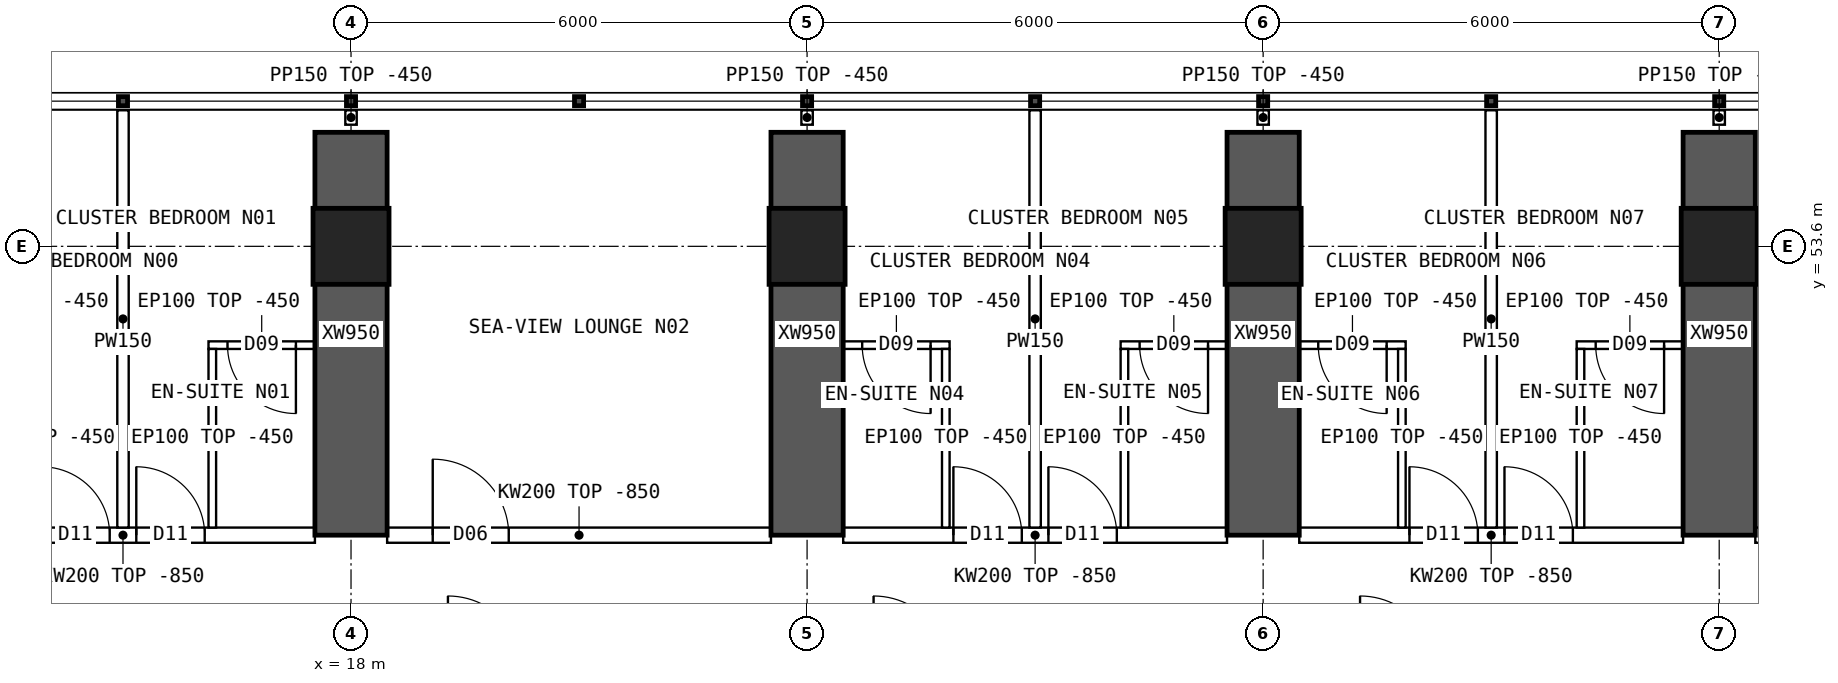
"""IFC4 building model, lengths in metres.
Left out: names, types, materials, properties, quantities, classifications, styles, units other than length and angle.
Written with IfcOpenShell. Run it as: python <this file> out.ifc"""

import sys

from ifc_helpers import new_model, si_unit, direction, frame, frame_2d, origin, origin_2d, place, context, subcontext, project, spatial, polyline, rectangle, hollow_rectangle, outline, extrude, element, fill, save


model = new_model("IFC4")
c1 = context("Model", 3, precision=1e-05, world=origin(), true_north=direction((0.0, 1.0)))
c2 = subcontext(c1, "Body", "Model", "MODEL_VIEW")
j1 = project(units=[si_unit("LENGTHUNIT", "METRE"), si_unit("PLANEANGLEUNIT", "RADIAN")], contexts=[c1])
p1 = place(None, origin())
s1 = spatial("IfcSite", under=j1, at=p1, CompositionType="ELEMENT")
p2 = place(p1, origin())
s2 = spatial("IfcBuilding", under=s1, at=p2, CompositionType="ELEMENT")
p3 = place(p2, frame((0.0, 0.0, 80.65)))
s3 = spatial("IfcBuildingStorey", under=s2, at=p3, CompositionType="ELEMENT", Elevation=80.65)
for number, where, z_axis, x_axis in (
    (1, (18.0, 53.6, 0.0), (0.0, 0.0, 1.0), (1.0, 0.0, 0.0)),
    (2, (24.0, 53.6, 0.0), (0.0, 0.0, 1.0), (1.0, 0.0, 0.0)),
    (3, (30.0, 53.6, 0.0), (0.0, 0.0, 1.0), (1.0, 0.0, 0.0)),
    (4, (36.0, 53.6, 0.0), (0.0, 0.0, 1.0), (1.0, 0.0, 0.0)),
):
    element("IfcColumn", number, at=place(p3, frame(where, z_axis=z_axis, x_axis=x_axis)), inside=s3, PredefinedType="COLUMN", context=c2, shape_type="SweptSolid", body=[
        extrude(hollow_rectangle(XDim=1.0, YDim=1.0, WallThickness=0.1, at=origin_2d()), origin(), (0.0, 0.0, 1.0), 3.75),
    ])
for number, where, z_axis, x_axis in (
    (5, (18.0, 49.8, 0.0), (0.0, 0.0, 1.0), (0.0, 1.0, 0.0)),
    (6, (24.0, 49.8, 0.0), (0.0, 0.0, 1.0), (0.0, 1.0, 0.0)),
    (7, (30.0, 49.8, 0.0), (0.0, 0.0, 1.0), (0.0, 1.0, 0.0)),
    (8, (36.0, 49.8, 0.0), (0.0, 0.0, 1.0), (0.0, 1.0, 0.0)),
):
    element("IfcWall", number, at=place(p3, frame(where, z_axis=z_axis, x_axis=x_axis)), inside=s3, PredefinedType="SHEAR", context=c2, shape_type="SweptSolid", body=[
        extrude(rectangle(XDim=5.3, YDim=0.95, at=frame_2d((2.65, 0.0))), origin(), (0.0, 0.0, 1.0), 3.75),
    ])
p4 = place(p3, frame((12.475, 49.8, 0.0), z_axis=(0.0, 0.0, 1.0), x_axis=(1.0, 0.0, 0.0)))
e9 = element("IfcWall", 9, at=p4, inside=s3, PredefinedType="SOLIDWALL", context=c2, shape_type="SweptSolid", body=[
    extrude(outline(polyline([(0.0, 0.0), (5.05, 0.0), (5.05, 2.9), (0.0, 2.9), (0.0, 0.0)])), frame((0.0, 0.1, 0.0), z_axis=(0.0, -1.0, 0.0), x_axis=(1.0, 0.0, 0.0)), (0.0, 0.0, 1.0), 0.2),
])
p5 = place(p4, frame((1.45, 0.0, 0.0)))
e10 = element("IfcOpeningElement", 10, at=p5, cuts=e9, PredefinedType="OPENING", context=c2, shape_type="SweptSolid", body=[
    extrude(rectangle(XDim=0.9, YDim=2.1, at=frame_2d((0.45, 1.05))), frame((0.0, 0.11, 0.0), z_axis=(0.0, -1.0, 0.0), x_axis=(1.0, 0.0, 0.0)), (0.0, 0.0, 1.0), 0.22),
])
p6 = place(p4, frame((2.7, 0.0, 0.0)))
e11 = element("IfcOpeningElement", 11, at=p6, cuts=e9, PredefinedType="OPENING", context=c2, shape_type="SweptSolid", body=[
    extrude(rectangle(XDim=0.9, YDim=2.1, at=frame_2d((0.45, 1.05))), frame((0.0, 0.11, 0.0), z_axis=(0.0, -1.0, 0.0), x_axis=(1.0, 0.0, 0.0)), (0.0, 0.0, 1.0), 0.22),
])
p7 = place(p3, frame((18.475, 49.8, 0.0), z_axis=(0.0, 0.0, 1.0), x_axis=(1.0, 0.0, 0.0)))
e12 = element("IfcWall", 12, at=p7, inside=s3, PredefinedType="SOLIDWALL", context=c2, shape_type="SweptSolid", body=[
    extrude(outline(polyline([(0.0, 0.0), (5.05, 0.0), (5.05, 2.9), (0.0, 2.9), (0.0, 0.0)])), frame((0.0, 0.1, 0.0), z_axis=(0.0, -1.0, 0.0), x_axis=(1.0, 0.0, 0.0)), (0.0, 0.0, 1.0), 0.2),
])
p8 = place(p7, frame((0.6, 0.0, 0.0)))
e13 = element("IfcOpeningElement", 13, at=p8, cuts=e12, PredefinedType="OPENING", context=c2, shape_type="SweptSolid", body=[
    extrude(rectangle(XDim=1.0, YDim=2.1, at=frame_2d((0.5, 1.05))), frame((0.0, 0.11, 0.0), z_axis=(0.0, -1.0, 0.0), x_axis=(1.0, 0.0, 0.0)), (0.0, 0.0, 1.0), 0.22),
])
p9 = place(p3, frame((24.475, 49.8, 0.0), z_axis=(0.0, 0.0, 1.0), x_axis=(1.0, 0.0, 0.0)))
e14 = element("IfcWall", 14, at=p9, inside=s3, PredefinedType="SOLIDWALL", context=c2, shape_type="SweptSolid", body=[
    extrude(outline(polyline([(0.0, 0.0), (5.05, 0.0), (5.05, 2.9), (0.0, 2.9), (0.0, 0.0)])), frame((0.0, 0.1, 0.0), z_axis=(0.0, -1.0, 0.0), x_axis=(1.0, 0.0, 0.0)), (0.0, 0.0, 1.0), 0.2),
])
p10 = place(p9, frame((1.45, 0.0, 0.0)))
e15 = element("IfcOpeningElement", 15, at=p10, cuts=e14, PredefinedType="OPENING", context=c2, shape_type="SweptSolid", body=[
    extrude(rectangle(XDim=0.9, YDim=2.1, at=frame_2d((0.45, 1.05))), frame((0.0, 0.11, 0.0), z_axis=(0.0, -1.0, 0.0), x_axis=(1.0, 0.0, 0.0)), (0.0, 0.0, 1.0), 0.22),
])
p11 = place(p9, frame((2.7, 0.0, 0.0)))
e16 = element("IfcOpeningElement", 16, at=p11, cuts=e14, PredefinedType="OPENING", context=c2, shape_type="SweptSolid", body=[
    extrude(rectangle(XDim=0.9, YDim=2.1, at=frame_2d((0.45, 1.05))), frame((0.0, 0.11, 0.0), z_axis=(0.0, -1.0, 0.0), x_axis=(1.0, 0.0, 0.0)), (0.0, 0.0, 1.0), 0.22),
])
p12 = place(p3, frame((30.475, 49.8, 0.0), z_axis=(0.0, 0.0, 1.0), x_axis=(1.0, 0.0, 0.0)))
e17 = element("IfcWall", 17, at=p12, inside=s3, PredefinedType="SOLIDWALL", context=c2, shape_type="SweptSolid", body=[
    extrude(outline(polyline([(0.0, 0.0), (5.05, 0.0), (5.05, 2.9), (0.0, 2.9), (0.0, 0.0)])), frame((0.0, 0.1, 0.0), z_axis=(0.0, -1.0, 0.0), x_axis=(1.0, 0.0, 0.0)), (0.0, 0.0, 1.0), 0.2),
])
p13 = place(p12, frame((1.45, 0.0, 0.0)))
e18 = element("IfcOpeningElement", 18, at=p13, cuts=e17, PredefinedType="OPENING", context=c2, shape_type="SweptSolid", body=[
    extrude(rectangle(XDim=0.9, YDim=2.1, at=frame_2d((0.45, 1.05))), frame((0.0, 0.11, 0.0), z_axis=(0.0, -1.0, 0.0), x_axis=(1.0, 0.0, 0.0)), (0.0, 0.0, 1.0), 0.22),
])
p14 = place(p12, frame((2.7, 0.0, 0.0)))
e19 = element("IfcOpeningElement", 19, at=p14, cuts=e17, PredefinedType="OPENING", context=c2, shape_type="SweptSolid", body=[
    extrude(rectangle(XDim=0.9, YDim=2.1, at=frame_2d((0.45, 1.05))), frame((0.0, 0.11, 0.0), z_axis=(0.0, -1.0, 0.0), x_axis=(1.0, 0.0, 0.0)), (0.0, 0.0, 1.0), 0.22),
])
p15 = place(p3, frame((36.475, 49.8, 0.0), z_axis=(0.0, 0.0, 1.0), x_axis=(1.0, 0.0, 0.0)))
e20 = element("IfcWall", 20, at=p15, inside=s3, PredefinedType="SOLIDWALL", context=c2, shape_type="SweptSolid", body=[
    extrude(outline(polyline([(0.0, 0.0), (5.05, 0.0), (5.05, 2.9), (0.0, 2.9), (0.0, 0.0)])), frame((0.0, 0.1, 0.0), z_axis=(0.0, -1.0, 0.0), x_axis=(1.0, 0.0, 0.0)), (0.0, 0.0, 1.0), 0.2),
])
p16 = place(p15, frame((0.3, 0.0, 0.0)))
e21 = element("IfcOpeningElement", 21, at=p16, cuts=e20, PredefinedType="OPENING", context=c2, shape_type="SweptSolid", body=[
    extrude(rectangle(XDim=1.0, YDim=2.1, at=frame_2d((0.5, 1.05))), frame((0.0, 0.11, 0.0), z_axis=(0.0, -1.0, 0.0), x_axis=(1.0, 0.0, 0.0)), (0.0, 0.0, 1.0), 0.22),
])
p17 = place(p3, frame((15.0, 55.39, 0.0), z_axis=(0.0, 0.0, 1.0), x_axis=(0.0, -1.0, 0.0)))
e22 = element("IfcWall", 22, at=p17, inside=s3, PredefinedType="PARTITIONING", context=c2, shape_type="SweptSolid", body=[
    extrude(outline(polyline([(0.0, 0.0), (5.49, 0.0), (5.49, 2.9), (5.442, 2.9), (5.44, 3.3), (1.992, 3.3), (1.99, 2.9), (1.592, 2.9), (1.59, 3.3), (0.0, 3.3), (0.0, 0.0)])), frame((0.0, 0.075, 0.0), z_axis=(0.0, -1.0, 0.0), x_axis=(1.0, 0.0, 0.0)), (0.0, 0.0, 1.0), 0.15),
])
p18 = place(p3, frame((16.125, 52.3, 0.0), z_axis=(0.0, 0.0, 1.0), x_axis=(1.0, 0.0, 0.0)))
e23 = element("IfcWall", 23, at=p18, inside=s3, PredefinedType="PARTITIONING", context=c2, shape_type="SweptSolid", body=[
    extrude(rectangle(XDim=1.4, YDim=0.1, at=frame_2d((0.7, 0.0))), origin(), (0.0, 0.0, 1.0), 3.3),
])
p19 = place(p18, frame((0.25, 0.0, 0.0)))
e24 = element("IfcOpeningElement", 24, at=p19, cuts=e23, PredefinedType="OPENING", context=c2, shape_type="SweptSolid", body=[
    extrude(rectangle(XDim=0.9, YDim=2.1, at=frame_2d((0.45, 1.05))), frame((0.0, 0.06, 0.0), z_axis=(0.0, -1.0, 0.0), x_axis=(1.0, 0.0, 0.0)), (0.0, 0.0, 1.0), 0.12),
])
p20 = place(p3, frame((16.175, 52.25, 0.0), z_axis=(0.0, 0.0, 1.0), x_axis=(0.0, -1.0, 0.0)))
e25 = element("IfcWall", 25, at=p20, inside=s3, PredefinedType="PARTITIONING", context=c2, shape_type="SweptSolid", body=[
    extrude(outline(polyline([(0.0, 0.0), (2.35, 0.0), (2.35, 2.9), (2.302, 2.9), (2.3, 3.3), (0.0, 3.3), (0.0, 0.0)])), frame((0.0, 0.05, 0.0), z_axis=(0.0, -1.0, 0.0), x_axis=(1.0, 0.0, 0.0)), (0.0, 0.0, 1.0), 0.1),
])
p21 = place(p3, frame((27.0, 55.39, 0.0), z_axis=(0.0, 0.0, 1.0), x_axis=(0.0, -1.0, 0.0)))
e26 = element("IfcWall", 26, at=p21, inside=s3, PredefinedType="PARTITIONING", context=c2, shape_type="SweptSolid", body=[
    extrude(outline(polyline([(0.0, 0.0), (5.49, 0.0), (5.49, 2.9), (5.442, 2.9), (5.44, 3.3), (1.992, 3.3), (1.99, 2.9), (1.592, 2.9), (1.59, 3.3), (0.0, 3.3), (0.0, 0.0)])), frame((0.0, 0.075, 0.0), z_axis=(0.0, -1.0, 0.0), x_axis=(1.0, 0.0, 0.0)), (0.0, 0.0, 1.0), 0.15),
])
p22 = place(p3, frame((24.475, 52.3, 0.0), z_axis=(0.0, 0.0, 1.0), x_axis=(1.0, 0.0, 0.0)))
e27 = element("IfcWall", 27, at=p22, inside=s3, PredefinedType="PARTITIONING", context=c2, shape_type="SweptSolid", body=[
    extrude(rectangle(XDim=1.4, YDim=0.1, at=frame_2d((0.7, 0.0))), origin(), (0.0, 0.0, 1.0), 3.3),
])
p23 = place(p22, frame((0.25, 0.0, 0.0)))
e28 = element("IfcOpeningElement", 28, at=p23, cuts=e27, PredefinedType="OPENING", context=c2, shape_type="SweptSolid", body=[
    extrude(rectangle(XDim=0.9, YDim=2.1, at=frame_2d((0.45, 1.05))), frame((0.0, 0.06, 0.0), z_axis=(0.0, -1.0, 0.0), x_axis=(1.0, 0.0, 0.0)), (0.0, 0.0, 1.0), 0.12),
])
p24 = place(p3, frame((25.825, 52.25, 0.0), z_axis=(0.0, 0.0, 1.0), x_axis=(0.0, -1.0, 0.0)))
e29 = element("IfcWall", 29, at=p24, inside=s3, PredefinedType="PARTITIONING", context=c2, shape_type="SweptSolid", body=[
    extrude(outline(polyline([(0.0, 0.0), (2.35, 0.0), (2.35, 2.9), (2.302, 2.9), (2.3, 3.3), (0.0, 3.3), (0.0, 0.0)])), frame((0.0, 0.05, 0.0), z_axis=(0.0, -1.0, 0.0), x_axis=(1.0, 0.0, 0.0)), (0.0, 0.0, 1.0), 0.1),
])
p25 = place(p3, frame((28.125, 52.3, 0.0), z_axis=(0.0, 0.0, 1.0), x_axis=(1.0, 0.0, 0.0)))
e30 = element("IfcWall", 30, at=p25, inside=s3, PredefinedType="PARTITIONING", context=c2, shape_type="SweptSolid", body=[
    extrude(rectangle(XDim=1.4, YDim=0.1, at=frame_2d((0.7, 0.0))), origin(), (0.0, 0.0, 1.0), 3.3),
])
p26 = place(p25, frame((0.25, 0.0, 0.0)))
e31 = element("IfcOpeningElement", 31, at=p26, cuts=e30, PredefinedType="OPENING", context=c2, shape_type="SweptSolid", body=[
    extrude(rectangle(XDim=0.9, YDim=2.1, at=frame_2d((0.45, 1.05))), frame((0.0, 0.06, 0.0), z_axis=(0.0, -1.0, 0.0), x_axis=(1.0, 0.0, 0.0)), (0.0, 0.0, 1.0), 0.12),
])
p27 = place(p3, frame((28.175, 52.25, 0.0), z_axis=(0.0, 0.0, 1.0), x_axis=(0.0, -1.0, 0.0)))
e32 = element("IfcWall", 32, at=p27, inside=s3, PredefinedType="PARTITIONING", context=c2, shape_type="SweptSolid", body=[
    extrude(outline(polyline([(0.0, 0.0), (2.35, 0.0), (2.35, 2.9), (2.302, 2.9), (2.3, 3.3), (0.0, 3.3), (0.0, 0.0)])), frame((0.0, 0.05, 0.0), z_axis=(0.0, -1.0, 0.0), x_axis=(1.0, 0.0, 0.0)), (0.0, 0.0, 1.0), 0.1),
])
p28 = place(p3, frame((33.0, 55.39, 0.0), z_axis=(0.0, 0.0, 1.0), x_axis=(0.0, -1.0, 0.0)))
e33 = element("IfcWall", 33, at=p28, inside=s3, PredefinedType="PARTITIONING", context=c2, shape_type="SweptSolid", body=[
    extrude(outline(polyline([(0.0, 0.0), (5.49, 0.0), (5.49, 2.9), (5.442, 2.9), (5.44, 3.3), (1.992, 3.3), (1.99, 2.9), (1.592, 2.9), (1.59, 3.3), (0.0, 3.3), (0.0, 0.0)])), frame((0.0, 0.075, 0.0), z_axis=(0.0, -1.0, 0.0), x_axis=(1.0, 0.0, 0.0)), (0.0, 0.0, 1.0), 0.15),
])
p29 = place(p3, frame((30.475, 52.3, 0.0), z_axis=(0.0, 0.0, 1.0), x_axis=(1.0, 0.0, 0.0)))
e34 = element("IfcWall", 34, at=p29, inside=s3, PredefinedType="PARTITIONING", context=c2, shape_type="SweptSolid", body=[
    extrude(rectangle(XDim=1.4, YDim=0.1, at=frame_2d((0.7, 0.0))), origin(), (0.0, 0.0, 1.0), 3.3),
])
p30 = place(p29, frame((0.25, 0.0, 0.0)))
e35 = element("IfcOpeningElement", 35, at=p30, cuts=e34, PredefinedType="OPENING", context=c2, shape_type="SweptSolid", body=[
    extrude(rectangle(XDim=0.9, YDim=2.1, at=frame_2d((0.45, 1.05))), frame((0.0, 0.06, 0.0), z_axis=(0.0, -1.0, 0.0), x_axis=(1.0, 0.0, 0.0)), (0.0, 0.0, 1.0), 0.12),
])
p31 = place(p3, frame((31.825, 52.25, 0.0), z_axis=(0.0, 0.0, 1.0), x_axis=(0.0, -1.0, 0.0)))
e36 = element("IfcWall", 36, at=p31, inside=s3, PredefinedType="PARTITIONING", context=c2, shape_type="SweptSolid", body=[
    extrude(outline(polyline([(0.0, 0.0), (2.35, 0.0), (2.35, 2.9), (2.302, 2.9), (2.3, 3.3), (0.0, 3.3), (0.0, 0.0)])), frame((0.0, 0.05, 0.0), z_axis=(0.0, -1.0, 0.0), x_axis=(1.0, 0.0, 0.0)), (0.0, 0.0, 1.0), 0.1),
])
p32 = place(p3, frame((34.125, 52.3, 0.0), z_axis=(0.0, 0.0, 1.0), x_axis=(1.0, 0.0, 0.0)))
e37 = element("IfcWall", 37, at=p32, inside=s3, PredefinedType="PARTITIONING", context=c2, shape_type="SweptSolid", body=[
    extrude(rectangle(XDim=1.4, YDim=0.1, at=frame_2d((0.7, 0.0))), origin(), (0.0, 0.0, 1.0), 3.3),
])
p33 = place(p32, frame((0.25, 0.0, 0.0)))
e38 = element("IfcOpeningElement", 38, at=p33, cuts=e37, PredefinedType="OPENING", context=c2, shape_type="SweptSolid", body=[
    extrude(rectangle(XDim=0.9, YDim=2.1, at=frame_2d((0.45, 1.05))), frame((0.0, 0.06, 0.0), z_axis=(0.0, -1.0, 0.0), x_axis=(1.0, 0.0, 0.0)), (0.0, 0.0, 1.0), 0.12),
])
p34 = place(p3, frame((34.175, 52.25, 0.0), z_axis=(0.0, 0.0, 1.0), x_axis=(0.0, -1.0, 0.0)))
e39 = element("IfcWall", 39, at=p34, inside=s3, PredefinedType="PARTITIONING", context=c2, shape_type="SweptSolid", body=[
    extrude(outline(polyline([(0.0, 0.0), (2.35, 0.0), (2.35, 2.9), (2.302, 2.9), (2.3, 3.3), (0.0, 3.3), (0.0, 0.0)])), frame((0.0, 0.05, 0.0), z_axis=(0.0, -1.0, 0.0), x_axis=(1.0, 0.0, 0.0)), (0.0, 0.0, 1.0), 0.1),
])
for number, where, z_axis, x_axis in (
    (40, (18.0, 55.2, 0.0), (0.0, 0.0, 1.0), (0.0, 1.0, 0.0)),
    (41, (24.0, 55.2, 0.0), (0.0, 0.0, 1.0), (0.0, 1.0, 0.0)),
    (42, (30.0, 55.2, 0.0), (0.0, 0.0, 1.0), (0.0, 1.0, 0.0)),
    (43, (36.0, 55.2, 0.0), (0.0, 0.0, 1.0), (0.0, 1.0, 0.0)),
):
    element("IfcWall", number, at=place(p3, frame(where, z_axis=z_axis, x_axis=x_axis)), inside=s3, PredefinedType="PARTITIONING", context=c2, shape_type="SweptSolid", body=[
        extrude(rectangle(XDim=0.19, YDim=0.15, at=frame_2d((0.095, 0.0))), origin(), (0.0, 0.0, 1.0), 3.3),
    ])
p35 = place(p5, origin())
e44 = element("IfcDoor", 44, at=p35, inside=s3, OperationType="SINGLE_SWING_LEFT", PredefinedType="DOOR", context=c2, shape_type="SweptSolid", body=[
    extrude(rectangle(XDim=0.9, YDim=2.1, at=frame_2d((0.45, 1.05))), frame((0.0, 0.025, 0.0), z_axis=(0.0, -1.0, 0.0), x_axis=(1.0, 0.0, 0.0)), (0.0, 0.0, 1.0), 0.05),
])
fill(e10, e44)
p36 = place(p19, origin())
e45 = element("IfcDoor", 45, at=p36, inside=s3, OperationType="SINGLE_SWING_RIGHT", PredefinedType="DOOR", context=c2, shape_type="SweptSolid", body=[
    extrude(rectangle(XDim=0.9, YDim=2.1, at=frame_2d((0.45, 1.05))), frame((0.0, 0.025, 0.0), z_axis=(0.0, -1.0, 0.0), x_axis=(1.0, 0.0, 0.0)), (0.0, 0.0, 1.0), 0.05),
])
fill(e24, e45)
p37 = place(p6, origin())
e46 = element("IfcDoor", 46, at=p37, inside=s3, OperationType="SINGLE_SWING_LEFT", PredefinedType="DOOR", context=c2, shape_type="SweptSolid", body=[
    extrude(rectangle(XDim=0.9, YDim=2.1, at=frame_2d((0.45, 1.05))), frame((0.0, 0.025, 0.0), z_axis=(0.0, -1.0, 0.0), x_axis=(1.0, 0.0, 0.0)), (0.0, 0.0, 1.0), 0.05),
])
fill(e11, e46)
p38 = place(p8, origin())
e47 = element("IfcDoor", 47, at=p38, inside=s3, OperationType="SINGLE_SWING_LEFT", PredefinedType="DOOR", context=c2, shape_type="SweptSolid", body=[
    extrude(rectangle(XDim=1.0, YDim=2.1, at=frame_2d((0.5, 1.05))), frame((0.0, 0.025, 0.0), z_axis=(0.0, -1.0, 0.0), x_axis=(1.0, 0.0, 0.0)), (0.0, 0.0, 1.0), 0.05),
])
fill(e13, e47)
p39 = place(p23, origin())
e48 = element("IfcDoor", 48, at=p39, inside=s3, OperationType="SINGLE_SWING_RIGHT", PredefinedType="DOOR", context=c2, shape_type="SweptSolid", body=[
    extrude(rectangle(XDim=0.9, YDim=2.1, at=frame_2d((0.45, 1.05))), frame((0.0, 0.025, 0.0), z_axis=(0.0, -1.0, 0.0), x_axis=(1.0, 0.0, 0.0)), (0.0, 0.0, 1.0), 0.05),
])
fill(e28, e48)
p40 = place(p10, origin())
e49 = element("IfcDoor", 49, at=p40, inside=s3, OperationType="SINGLE_SWING_LEFT", PredefinedType="DOOR", context=c2, shape_type="SweptSolid", body=[
    extrude(rectangle(XDim=0.9, YDim=2.1, at=frame_2d((0.45, 1.05))), frame((0.0, 0.025, 0.0), z_axis=(0.0, -1.0, 0.0), x_axis=(1.0, 0.0, 0.0)), (0.0, 0.0, 1.0), 0.05),
])
fill(e15, e49)
p41 = place(p26, origin())
e50 = element("IfcDoor", 50, at=p41, inside=s3, OperationType="SINGLE_SWING_RIGHT", PredefinedType="DOOR", context=c2, shape_type="SweptSolid", body=[
    extrude(rectangle(XDim=0.9, YDim=2.1, at=frame_2d((0.45, 1.05))), frame((0.0, 0.025, 0.0), z_axis=(0.0, -1.0, 0.0), x_axis=(1.0, 0.0, 0.0)), (0.0, 0.0, 1.0), 0.05),
])
fill(e31, e50)
p42 = place(p11, origin())
e51 = element("IfcDoor", 51, at=p42, inside=s3, OperationType="SINGLE_SWING_LEFT", PredefinedType="DOOR", context=c2, shape_type="SweptSolid", body=[
    extrude(rectangle(XDim=0.9, YDim=2.1, at=frame_2d((0.45, 1.05))), frame((0.0, 0.025, 0.0), z_axis=(0.0, -1.0, 0.0), x_axis=(1.0, 0.0, 0.0)), (0.0, 0.0, 1.0), 0.05),
])
fill(e16, e51)
p43 = place(p30, origin())
e52 = element("IfcDoor", 52, at=p43, inside=s3, OperationType="SINGLE_SWING_RIGHT", PredefinedType="DOOR", context=c2, shape_type="SweptSolid", body=[
    extrude(rectangle(XDim=0.9, YDim=2.1, at=frame_2d((0.45, 1.05))), frame((0.0, 0.025, 0.0), z_axis=(0.0, -1.0, 0.0), x_axis=(1.0, 0.0, 0.0)), (0.0, 0.0, 1.0), 0.05),
])
fill(e35, e52)
p44 = place(p13, origin())
e53 = element("IfcDoor", 53, at=p44, inside=s3, OperationType="SINGLE_SWING_LEFT", PredefinedType="DOOR", context=c2, shape_type="SweptSolid", body=[
    extrude(rectangle(XDim=0.9, YDim=2.1, at=frame_2d((0.45, 1.05))), frame((0.0, 0.025, 0.0), z_axis=(0.0, -1.0, 0.0), x_axis=(1.0, 0.0, 0.0)), (0.0, 0.0, 1.0), 0.05),
])
fill(e18, e53)
p45 = place(p33, origin())
e54 = element("IfcDoor", 54, at=p45, inside=s3, OperationType="SINGLE_SWING_RIGHT", PredefinedType="DOOR", context=c2, shape_type="SweptSolid", body=[
    extrude(rectangle(XDim=0.9, YDim=2.1, at=frame_2d((0.45, 1.05))), frame((0.0, 0.025, 0.0), z_axis=(0.0, -1.0, 0.0), x_axis=(1.0, 0.0, 0.0)), (0.0, 0.0, 1.0), 0.05),
])
fill(e38, e54)
p46 = place(p14, origin())
e55 = element("IfcDoor", 55, at=p46, inside=s3, OperationType="SINGLE_SWING_LEFT", PredefinedType="DOOR", context=c2, shape_type="SweptSolid", body=[
    extrude(rectangle(XDim=0.9, YDim=2.1, at=frame_2d((0.45, 1.05))), frame((0.0, 0.025, 0.0), z_axis=(0.0, -1.0, 0.0), x_axis=(1.0, 0.0, 0.0)), (0.0, 0.0, 1.0), 0.05),
])
fill(e19, e55)
save(model, sys.argv[1])
